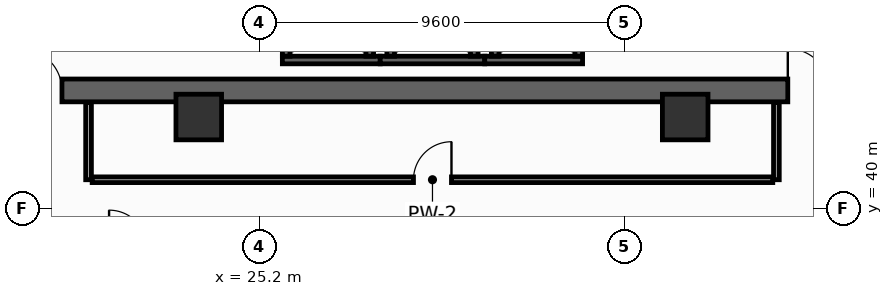
"""IFC4 building model, lengths in metres.
Left out: names, types, materials, properties, quantities, classifications, styles, units other than length and angle.
Written with IfcOpenShell. Run it as: python <this file> out.ifc"""

import sys

from ifc_helpers import new_model, si_unit, direction, frame, frame_2d, origin, origin_2d, place, context, subcontext, project, spatial, rectangle, hollow_rectangle, extrude, element, fill, save


model = new_model("IFC4")
c1 = context("Model", 3, precision=1e-05, world=origin(), true_north=direction((0.0, 1.0)))
c2 = subcontext(c1, "Body", "Model", "MODEL_VIEW")
j1 = project(units=[si_unit("LENGTHUNIT", "METRE"), si_unit("PLANEANGLEUNIT", "RADIAN")], contexts=[c1])
p1 = place(None, origin())
s1 = spatial("IfcSite", under=j1, at=p1, CompositionType="ELEMENT")
p2 = place(p1, origin())
s2 = spatial("IfcBuilding", under=s1, at=p2, CompositionType="ELEMENT")
p3 = place(p2, frame((0.0, 0.0, 82.4)))
s3 = spatial("IfcBuildingStorey", under=s2, at=p3, CompositionType="ELEMENT", Elevation=82.4)
p4 = place(p3, frame((13.5, 43.1, 0.0), z_axis=(0.0, 0.0, 1.0), x_axis=(1.0, 0.0, 0.0)))
e1 = element("IfcWall", 1, at=p4, inside=s3, PredefinedType="SHEAR", context=c2, shape_type="SweptSolid", body=[
    extrude(rectangle(XDim=32.9, YDim=0.6, at=frame_2d((16.45, 0.0))), origin(), (0.0, 0.0, 1.0), 3.95),
])
p5 = place(p4, frame((5.4, 0.0, 0.0)))
e2 = element("IfcOpeningElement", 2, at=p5, cuts=e1, PredefinedType="OPENING", context=c2, shape_type="SweptSolid", body=[
    extrude(rectangle(XDim=1.1, YDim=2.15, at=frame_2d((0.55, 1.075))), frame((0.0, 0.31, 0.0), z_axis=(0.0, -1.0, 0.0), x_axis=(1.0, 0.0, 0.0)), (0.0, 0.0, 1.0), 0.62),
])
p6 = place(p4, frame((25.6, 0.0, 0.0)))
e3 = element("IfcOpeningElement", 3, at=p6, cuts=e1, PredefinedType="OPENING", context=c2, shape_type="SweptSolid", body=[
    extrude(rectangle(XDim=1.1, YDim=2.15, at=frame_2d((0.55, 1.075))), frame((0.0, 0.31, 0.0), z_axis=(0.0, -1.0, 0.0), x_axis=(1.0, 0.0, 0.0)), (0.0, 0.0, 1.0), 0.62),
])
for number, where, z_axis, x_axis in (
    (4, (23.6, 42.4, 0.0), (0.0, 0.0, 1.0), (1.0, 0.0, 0.0)),
    (5, (36.4, 42.4, 0.0), (0.0, 0.0, 1.0), (1.0, 0.0, 0.0)),
):
    element("IfcColumn", number, at=place(p3, frame(where, z_axis=z_axis, x_axis=x_axis)), inside=s3, PredefinedType="COLUMN", context=c2, shape_type="SweptSolid", body=[
        extrude(hollow_rectangle(XDim=1.2, YDim=1.2, WallThickness=0.055, at=origin_2d()), origin(), (0.0, 0.0, 1.0), 4.4),
    ])
p7 = place(p3, frame((25.8, 43.9, 0.0), z_axis=(0.0, 0.0, 1.0), x_axis=(1.0, 0.0, 0.0)))
e6 = element("IfcWall", 6, at=p7, inside=s3, PredefinedType="SHEAR", context=c2, shape_type="SweptSolid", body=[
    extrude(rectangle(XDim=2.575, YDim=0.2, at=frame_2d((1.288, 0.0))), origin(), (0.0, 0.0, 1.0), 3.95),
])
for number, where, z_axis, x_axis in (
    (7, (25.9, 44.0, 0.0), (0.0, 0.0, 1.0), (0.0, 1.0, 0.0)),
    (8, (28.1, 44.0, 0.0), (0.0, 0.0, 1.0), (0.0, 1.0, 0.0)),
):
    element("IfcWall", number, at=place(p3, frame(where, z_axis=z_axis, x_axis=x_axis)), inside=s3, PredefinedType="SHEAR", context=c2, shape_type="SweptSolid", body=[
        extrude(rectangle(XDim=2.3, YDim=0.2, at=frame_2d((1.15, 0.0))), origin(), (0.0, 0.0, 1.0), 3.95),
    ])
p8 = place(p3, frame((28.375, 43.9, 0.0), z_axis=(0.0, 0.0, 1.0), x_axis=(1.0, 0.0, 0.0)))
e9 = element("IfcWall", 9, at=p8, inside=s3, PredefinedType="SHEAR", context=c2, shape_type="SweptSolid", body=[
    extrude(rectangle(XDim=2.75, YDim=0.2, at=frame_2d((1.375, 0.0))), origin(), (0.0, 0.0, 1.0), 3.95),
])
for number, where, z_axis, x_axis in (
    (10, (28.65, 44.0, 0.0), (0.0, 0.0, 1.0), (0.0, 1.0, 0.0)),
    (11, (30.85, 44.0, 0.0), (0.0, 0.0, 1.0), (0.0, 1.0, 0.0)),
):
    element("IfcWall", number, at=place(p3, frame(where, z_axis=z_axis, x_axis=x_axis)), inside=s3, PredefinedType="SHEAR", context=c2, shape_type="SweptSolid", body=[
        extrude(rectangle(XDim=2.3, YDim=0.2, at=frame_2d((1.15, 0.0))), origin(), (0.0, 0.0, 1.0), 3.95),
    ])
p9 = place(p3, frame((31.125, 43.9, 0.0), z_axis=(0.0, 0.0, 1.0), x_axis=(1.0, 0.0, 0.0)))
e12 = element("IfcWall", 12, at=p9, inside=s3, PredefinedType="SHEAR", context=c2, shape_type="SweptSolid", body=[
    extrude(rectangle(XDim=2.575, YDim=0.2, at=frame_2d((1.288, 0.0))), origin(), (0.0, 0.0, 1.0), 3.95),
])
for number, where, z_axis, x_axis in (
    (13, (31.4, 44.0, 0.0), (0.0, 0.0, 1.0), (0.0, 1.0, 0.0)),
    (14, (33.6, 44.0, 0.0), (0.0, 0.0, 1.0), (0.0, 1.0, 0.0)),
):
    element("IfcWall", number, at=place(p3, frame(where, z_axis=z_axis, x_axis=x_axis)), inside=s3, PredefinedType="SHEAR", context=c2, shape_type="SweptSolid", body=[
        extrude(rectangle(XDim=2.3, YDim=0.2, at=frame_2d((1.15, 0.0))), origin(), (0.0, 0.0, 1.0), 3.95),
    ])
for number, where, z_axis, x_axis in (
    (15, (20.7, 40.75, 0.0), (0.0, 0.0, 1.0), (0.0, 1.0, 0.0)),
    (16, (38.8, 40.75, 0.0), (0.0, 0.0, 1.0), (0.0, 1.0, 0.0)),
):
    element("IfcWall", number, at=place(p3, frame(where, z_axis=z_axis, x_axis=x_axis)), inside=s3, PredefinedType="PARTITIONING", context=c2, shape_type="SweptSolid", body=[
        extrude(rectangle(XDim=2.03, YDim=0.15, at=frame_2d((1.015, 0.0))), origin(), (0.0, 0.0, 1.0), 3.95),
    ])
p10 = place(p3, frame((20.795, 40.75, 0.0), z_axis=(0.0, 0.0, 1.0), x_axis=(1.0, 0.0, 0.0)))
e17 = element("IfcWall", 17, at=p10, inside=s3, PredefinedType="PARTITIONING", context=c2, shape_type="SweptSolid", body=[
    extrude(rectangle(XDim=17.91, YDim=0.15, at=frame_2d((8.955, 0.0))), origin(), (0.0, 0.0, 1.0), 3.135),
])
p11 = place(p10, frame((8.455, 0.0, 0.0)))
e18 = element("IfcOpeningElement", 18, at=p11, cuts=e17, PredefinedType="OPENING", context=c2, shape_type="SweptSolid", body=[
    extrude(rectangle(XDim=1.0, YDim=2.15, at=frame_2d((0.5, 1.075))), frame((0.0, 0.085, 0.0), z_axis=(0.0, -1.0, 0.0), x_axis=(1.0, 0.0, 0.0)), (0.0, 0.0, 1.0), 0.17),
])
p12 = place(p5, origin())
e19 = element("IfcDoor", 19, at=p12, inside=s3, OperationType="SINGLE_SWING_LEFT", PredefinedType="DOOR", context=c2, shape_type="SweptSolid", body=[
    extrude(rectangle(XDim=1.1, YDim=2.15, at=frame_2d((0.55, 1.075))), frame((0.0, 0.025, 0.0), z_axis=(0.0, -1.0, 0.0), x_axis=(1.0, 0.0, 0.0)), (0.0, 0.0, 1.0), 0.05),
])
fill(e2, e19)
p13 = place(p6, origin())
e20 = element("IfcDoor", 20, at=p13, inside=s3, OperationType="SINGLE_SWING_LEFT", PredefinedType="DOOR", context=c2, shape_type="SweptSolid", body=[
    extrude(rectangle(XDim=1.1, YDim=2.15, at=frame_2d((0.55, 1.075))), frame((0.0, 0.025, 0.0), z_axis=(0.0, -1.0, 0.0), x_axis=(1.0, 0.0, 0.0)), (0.0, 0.0, 1.0), 0.05),
])
fill(e3, e20)
p14 = place(p11, origin())
e21 = element("IfcDoor", 21, at=p14, inside=s3, OperationType="SINGLE_SWING_RIGHT", PredefinedType="DOOR", context=c2, shape_type="SweptSolid", body=[
    extrude(rectangle(XDim=1.0, YDim=2.15, at=frame_2d((0.5, 1.075))), frame((0.0, 0.025, 0.0), z_axis=(0.0, -1.0, 0.0), x_axis=(1.0, 0.0, 0.0)), (0.0, 0.0, 1.0), 0.05),
])
fill(e18, e21)
save(model, sys.argv[1])
